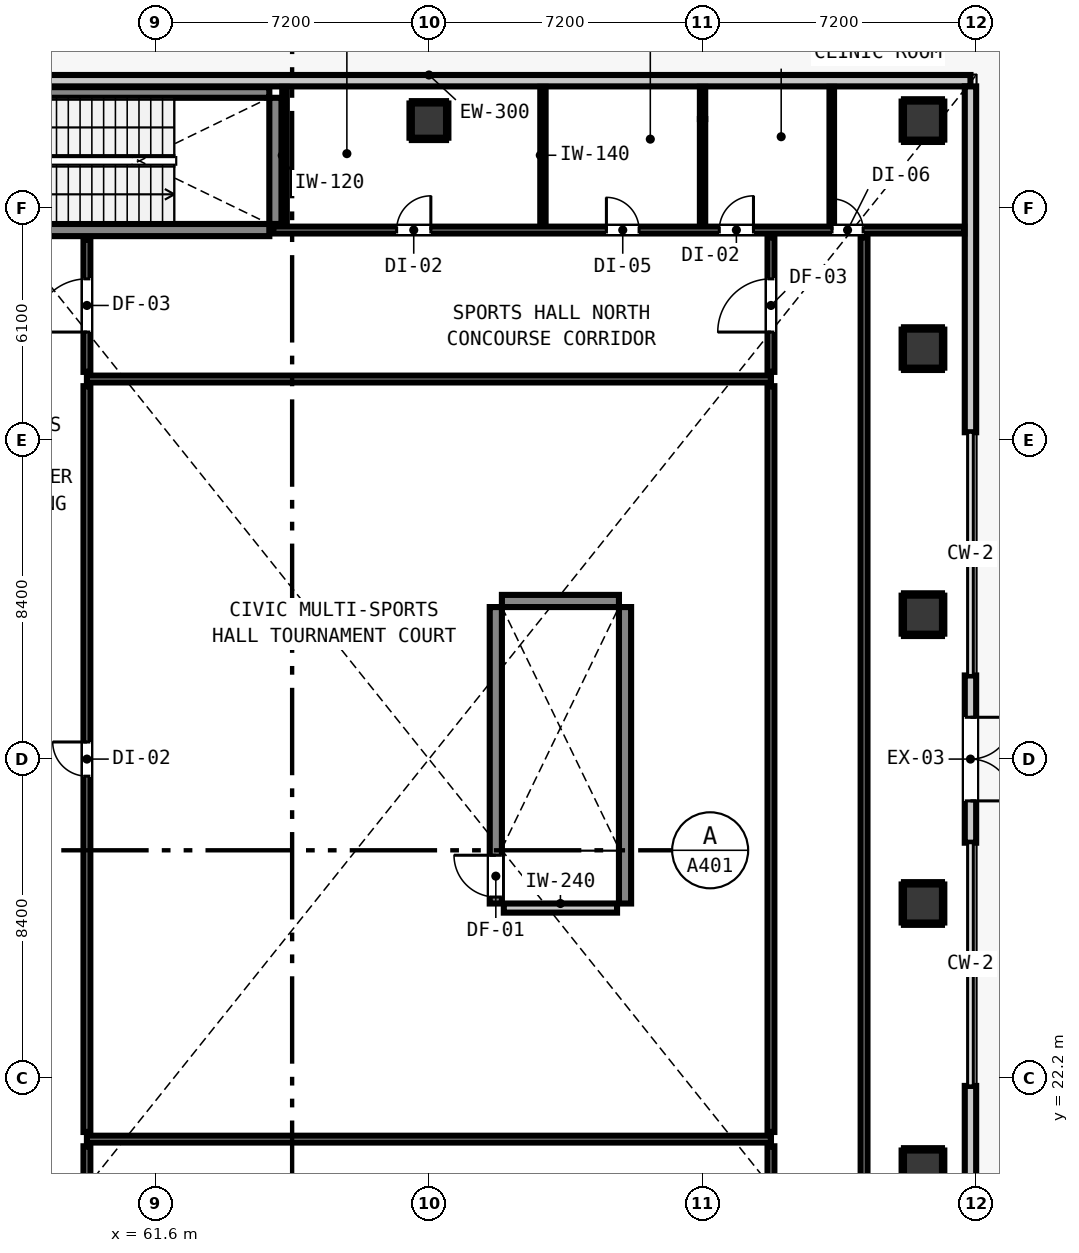
"""IFC4 building model, lengths in metres.
Left out: names, types, materials, properties, quantities, classifications, styles, units other than length and angle.
Written with IfcOpenShell. Run it as: python <this file> out.ifc"""

import sys

from ifc_helpers import new_model, si_unit, direction, frame, frame_2d, origin, origin_2d, place, context, subcontext, project, spatial, rectangle, circle, extrude, element, fill, save


model = new_model("IFC4")
c1 = context("Model", 3, precision=1e-05, world=origin(), true_north=direction((0.0, 1.0)))
c2 = subcontext(c1, "Body", "Model", "MODEL_VIEW")
j1 = project(units=[si_unit("LENGTHUNIT", "METRE"), si_unit("PLANEANGLEUNIT", "RADIAN")], contexts=[c1])
p1 = place(None, origin())
s1 = spatial("IfcSite", under=j1, at=p1, CompositionType="ELEMENT")
p2 = place(p1, origin())
s2 = spatial("IfcBuilding", under=s1, at=p2, CompositionType="ELEMENT")
p3 = place(p2, origin())
s3 = spatial("IfcBuildingStorey", under=s2, at=p3, CompositionType="ELEMENT", Elevation=0.0)
p4 = place(p3, frame((64.76, 44.68, 0.0), z_axis=(0.0, 0.0, 1.0), x_axis=(0.0, 1.0, 0.0)))
e1 = element("IfcWall", 1, at=p4, inside=s3, PredefinedType="SHEAR", context=c2, shape_type="SweptSolid", body=[
    extrude(rectangle(XDim=3.32, YDim=0.32, at=frame_2d((1.66, 0.0))), origin(), (0.0, 0.0, 1.0), 5.2),
])
p5 = place(p3, frame((56.2, 48.14, 0.0), z_axis=(0.0, 0.0, 1.0), x_axis=(1.0, 0.0, 0.0)))
e2 = element("IfcWall", 2, at=p5, inside=s3, PredefinedType="SHEAR", context=c2, shape_type="SweptSolid", body=[
    extrude(rectangle(XDim=8.4, YDim=0.28, at=frame_2d((4.2, 0.0))), origin(), (0.0, 0.0, 1.0), 5.2),
])
p6 = place(p3, frame((56.2, 44.52, 0.0), z_axis=(0.0, 0.0, 1.0), x_axis=(1.0, 0.0, 0.0)))
e3 = element("IfcWall", 3, at=p6, inside=s3, PredefinedType="SHEAR", context=c2, shape_type="SweptSolid", body=[
    extrude(rectangle(XDim=8.4, YDim=0.32, at=frame_2d((4.2, 0.0))), origin(), (0.0, 0.0, 1.0), 5.2),
])
p7 = place(p6, frame((0.23, 0.0, 0.0)))
e4 = element("IfcOpeningElement", 4, at=p7, cuts=e3, PredefinedType="OPENING", context=c2, shape_type="SweptSolid", body=[
    extrude(rectangle(XDim=1.1, YDim=2.15, at=frame_2d((0.55, 1.075))), frame((0.0, 0.17, 0.0), z_axis=(0.0, -1.0, 0.0), x_axis=(1.0, 0.0, 0.0)), (0.0, 0.0, 1.0), 0.34),
])
p8 = place(p3, frame((70.72, 34.76, 0.0), z_axis=(0.0, 0.0, 1.0), x_axis=(1.0, 0.0, 0.0)))
e5 = element("IfcWall", 5, at=p8, inside=s3, PredefinedType="SHEAR", context=c2, shape_type="SweptSolid", body=[
    extrude(rectangle(XDim=3.08, YDim=0.32, at=frame_2d((1.54, 0.0))), origin(), (0.0, 0.0, 1.0), 5.2),
])
p9 = place(p3, frame((73.96, 26.8, 0.0), z_axis=(0.0, 0.0, 1.0), x_axis=(0.0, 1.0, 0.0)))
e6 = element("IfcWall", 6, at=p9, inside=s3, PredefinedType="SHEAR", context=c2, shape_type="SweptSolid", body=[
    extrude(rectangle(XDim=7.8, YDim=0.32, at=frame_2d((3.9, 0.0))), origin(), (0.0, 0.0, 1.0), 5.2),
])
p10 = place(p3, frame((70.56, 26.8, 0.0), z_axis=(0.0, 0.0, 1.0), x_axis=(0.0, 1.0, 0.0)))
e7 = element("IfcWall", 7, at=p10, inside=s3, PredefinedType="SHEAR", context=c2, shape_type="SweptSolid", body=[
    extrude(rectangle(XDim=7.8, YDim=0.32, at=frame_2d((3.9, 0.0))), origin(), (0.0, 0.0, 1.0), 5.2),
])
p11 = place(p10, frame((0.17, 0.0, 0.0)))
e8 = element("IfcOpeningElement", 8, at=p11, cuts=e7, PredefinedType="OPENING", context=c2, shape_type="SweptSolid", body=[
    extrude(rectangle(XDim=1.1, YDim=2.15, at=frame_2d((0.55, 1.075))), frame((0.0, 0.17, 0.0), z_axis=(0.0, -1.0, 0.0), x_axis=(1.0, 0.0, 0.0)), (0.0, 0.0, 1.0), 0.34),
])
for number, where, z_axis, x_axis in (
    (9, (81.8, 19.8, 0.0), (0.0, 0.0, 1.0), (1.0, 0.0, 0.0)),
    (10, (81.8, 26.8, 0.0), (0.0, 0.0, 1.0), (1.0, 0.0, 0.0)),
    (11, (81.8, 34.4, 0.0), (0.0, 0.0, 1.0), (1.0, 0.0, 0.0)),
    (12, (81.8, 41.4, 0.0), (0.0, 0.0, 1.0), (1.0, 0.0, 0.0)),
    (13, (81.8, 47.4, 0.0), (0.0, 0.0, 1.0), (1.0, 0.0, 0.0)),
):
    element("IfcColumn", number, at=place(p3, frame(where, z_axis=z_axis, x_axis=x_axis)), inside=s3, PredefinedType="COLUMN", context=c2, shape_type="SweptSolid", body=[
        extrude(rectangle(XDim=1.0, YDim=1.0, at=origin_2d()), origin(), (0.0, 0.0, 1.0), 5.2),
    ])
p12 = place(p3, frame((68.8, 47.4, 0.0), z_axis=(0.0, 0.0, 1.0), x_axis=(1.0, 0.0, 0.0)))
e14 = element("IfcColumn", 14, at=p12, inside=s3, PredefinedType="COLUMN", context=c2, shape_type="SweptSolid", body=[
    extrude(circle(Radius=0.45, at=origin_2d()), origin(), (0.0, 0.0, 1.0), 5.2),
])
p13 = place(p3, frame((54.55, 48.45, 0.0), z_axis=(0.0, 0.0, 1.0), x_axis=(1.0, 0.0, 0.0)))
e15 = element("IfcWall", 15, at=p13, inside=s3, PredefinedType="STANDARD", context=c2, shape_type="SweptSolid", body=[
    extrude(rectangle(XDim=28.5, YDim=0.3, at=frame_2d((14.25, 0.0))), origin(), (0.0, 0.0, 1.0), 4.92),
])
p14 = place(p3, frame((83.05, 48.3, 0.0), z_axis=(0.0, 0.0, 1.0), x_axis=(0.0, -1.0, 0.0)))
e16 = element("IfcWall", 16, at=p14, inside=s3, PredefinedType="STANDARD", context=c2, shape_type="SweptSolid", body=[
    extrude(rectangle(XDim=9.1, YDim=0.3, at=frame_2d((4.55, 0.0))), origin(), (0.0, 0.0, 1.0), 4.92),
])
p15 = place(p3, frame((83.05, 32.8, 0.0), z_axis=(0.0, 0.0, 1.0), x_axis=(0.0, -1.0, 0.0)))
e17 = element("IfcWall", 17, at=p15, inside=s3, PredefinedType="STANDARD", context=c2, shape_type="SweptSolid", body=[
    extrude(rectangle(XDim=4.4, YDim=0.3, at=frame_2d((2.2, 0.0))), origin(), (0.0, 0.0, 1.0), 4.92),
])
p16 = place(p15, frame((1.1, 0.0, 0.0)))
e18 = element("IfcOpeningElement", 18, at=p16, cuts=e17, PredefinedType="OPENING", context=c2, shape_type="SweptSolid", body=[
    extrude(rectangle(XDim=2.2, YDim=2.4, at=frame_2d((1.1, 1.2))), frame((0.0, 0.16, 0.0), z_axis=(0.0, -1.0, 0.0), x_axis=(1.0, 0.0, 0.0)), (0.0, 0.0, 1.0), 0.32),
])
p17 = place(p3, frame((83.05, 22.0, 0.0), z_axis=(0.0, 0.0, 1.0), x_axis=(0.0, -1.0, 0.0)))
e19 = element("IfcWall", 19, at=p17, inside=s3, PredefinedType="STANDARD", context=c2, shape_type="SweptSolid", body=[
    extrude(rectangle(XDim=9.1, YDim=0.3, at=frame_2d((4.55, 0.0))), origin(), (0.0, 0.0, 1.0), 4.92),
])
p18 = place(p3, frame((70.77, 26.68, 0.0), z_axis=(0.0, 0.0, 1.0), x_axis=(1.0, 0.0, 0.0)))
e20 = element("IfcWall", 20, at=p18, inside=s3, PredefinedType="PARTITIONING", context=c2, shape_type="SweptSolid", body=[
    extrude(rectangle(XDim=2.98, YDim=0.24, at=frame_2d((1.49, 0.0))), origin(), (0.0, 0.0, 1.0), 4.92),
])
for number, where, z_axis, x_axis in (
    (21, (59.8, 20.6, 0.0), (0.0, 0.0, 1.0), (1.0, 0.0, 0.0)),
    (22, (59.8, 40.6, 0.0), (0.0, 0.0, 1.0), (1.0, 0.0, 0.0)),
):
    element("IfcWall", number, at=place(p3, frame(where, z_axis=z_axis, x_axis=x_axis)), inside=s3, PredefinedType="PARTITIONING", context=c2, shape_type="SweptSolid", body=[
        extrude(rectangle(XDim=18.0, YDim=0.18, at=frame_2d((9.0, 0.0))), origin(), (0.0, 0.0, 1.0), 4.92),
    ])
p19 = place(p3, frame((64.7, 44.52, 0.0), z_axis=(0.0, 0.0, 1.0), x_axis=(1.0, 0.0, 0.0)))
e23 = element("IfcWall", 23, at=p19, inside=s3, PredefinedType="PARTITIONING", context=c2, shape_type="SweptSolid", body=[
    extrude(rectangle(XDim=18.188, YDim=0.18, at=frame_2d((9.094, 0.0))), origin(), (0.0, 0.0, 1.0), 4.92),
])
p20 = place(p19, frame((3.25, 0.0, 0.0)))
e24 = element("IfcOpeningElement", 24, at=p20, cuts=e23, PredefinedType="OPENING", context=c2, shape_type="SweptSolid", body=[
    extrude(rectangle(XDim=0.9, YDim=2.1, at=frame_2d((0.45, 1.05))), frame((0.0, 0.1, 0.0), z_axis=(0.0, -1.0, 0.0), x_axis=(1.0, 0.0, 0.0)), (0.0, 0.0, 1.0), 0.2),
])
p21 = place(p19, frame((8.77, 0.0, 0.0)))
e25 = element("IfcOpeningElement", 25, at=p21, cuts=e23, PredefinedType="OPENING", context=c2, shape_type="SweptSolid", body=[
    extrude(rectangle(XDim=0.86, YDim=2.02, at=frame_2d((0.43, 1.01))), frame((0.0, 0.1, 0.0), z_axis=(0.0, -1.0, 0.0), x_axis=(1.0, 0.0, 0.0)), (0.0, 0.0, 1.0), 0.2),
])
p22 = place(p19, frame((11.74, 0.0, 0.0)))
e26 = element("IfcOpeningElement", 26, at=p22, cuts=e23, PredefinedType="OPENING", context=c2, shape_type="SweptSolid", body=[
    extrude(rectangle(XDim=0.9, YDim=2.1, at=frame_2d((0.45, 1.05))), frame((0.0, 0.1, 0.0), z_axis=(0.0, -1.0, 0.0), x_axis=(1.0, 0.0, 0.0)), (0.0, 0.0, 1.0), 0.2),
])
p23 = place(p19, frame((14.706, 0.0, 0.0)))
e27 = element("IfcOpeningElement", 27, at=p23, cuts=e23, PredefinedType="OPENING", context=c2, shape_type="SweptSolid", body=[
    extrude(rectangle(XDim=0.82, YDim=2.0, at=frame_2d((0.41, 1.0))), frame((0.0, 0.1, 0.0), z_axis=(0.0, -1.0, 0.0), x_axis=(1.0, 0.0, 0.0)), (0.0, 0.0, 1.0), 0.2),
])
p24 = place(p3, frame((59.8, 16.94, 0.0), z_axis=(0.0, 0.0, 1.0), x_axis=(0.0, 1.0, 0.0)))
e28 = element("IfcWall", 28, at=p24, inside=s3, PredefinedType="PARTITIONING", context=c2, shape_type="SweptSolid", body=[
    extrude(rectangle(XDim=3.472, YDim=0.18, at=frame_2d((1.736, 0.0))), origin(), (0.0, 0.0, 1.0), 4.92),
])
p25 = place(p24, frame((1.024, 0.0, 0.0)))
e29 = element("IfcOpeningElement", 29, at=p25, cuts=e28, PredefinedType="OPENING", context=c2, shape_type="SweptSolid", body=[
    extrude(rectangle(XDim=1.4, YDim=2.15, at=frame_2d((0.7, 1.075))), frame((0.0, 0.1, 0.0), z_axis=(0.0, -1.0, 0.0), x_axis=(1.0, 0.0, 0.0)), (0.0, 0.0, 1.0), 0.2),
])
p26 = place(p3, frame((59.8, 20.788, 0.0), z_axis=(0.0, 0.0, 1.0), x_axis=(0.0, 1.0, 0.0)))
e30 = element("IfcWall", 30, at=p26, inside=s3, PredefinedType="PARTITIONING", context=c2, shape_type="SweptSolid", body=[
    extrude(rectangle(XDim=19.624, YDim=0.18, at=frame_2d((9.812, 0.0))), origin(), (0.0, 0.0, 1.0), 4.92),
])
p27 = place(p26, frame((9.362, 0.0, 0.0)))
e31 = element("IfcOpeningElement", 31, at=p27, cuts=e30, PredefinedType="OPENING", context=c2, shape_type="SweptSolid", body=[
    extrude(rectangle(XDim=0.9, YDim=2.1, at=frame_2d((0.45, 1.05))), frame((0.0, 0.1, 0.0), z_axis=(0.0, -1.0, 0.0), x_axis=(1.0, 0.0, 0.0)), (0.0, 0.0, 1.0), 0.2),
])
p28 = place(p3, frame((59.8, 40.788, 0.0), z_axis=(0.0, 0.0, 1.0), x_axis=(0.0, 1.0, 0.0)))
e32 = element("IfcWall", 32, at=p28, inside=s3, PredefinedType="PARTITIONING", context=c2, shape_type="SweptSolid", body=[
    extrude(rectangle(XDim=3.472, YDim=0.18, at=frame_2d((1.736, 0.0))), origin(), (0.0, 0.0, 1.0), 4.92),
])
p29 = place(p28, frame((1.048, 0.0, 0.0)))
e33 = element("IfcOpeningElement", 33, at=p29, cuts=e32, PredefinedType="OPENING", context=c2, shape_type="SweptSolid", body=[
    extrude(rectangle(XDim=1.4, YDim=2.15, at=frame_2d((0.7, 1.075))), frame((0.0, 0.1, 0.0), z_axis=(0.0, -1.0, 0.0), x_axis=(1.0, 0.0, 0.0)), (0.0, 0.0, 1.0), 0.2),
])
p30 = place(p3, frame((77.8, 16.868, 0.0), z_axis=(0.0, 0.0, 1.0), x_axis=(0.0, 1.0, 0.0)))
e34 = element("IfcWall", 34, at=p30, inside=s3, PredefinedType="PARTITIONING", context=c2, shape_type="SweptSolid", body=[
    extrude(rectangle(XDim=3.544, YDim=0.18, at=frame_2d((1.772, 0.0))), origin(), (0.0, 0.0, 1.0), 4.92),
])
p31 = place(p30, frame((1.096, 0.0, 0.0)))
e35 = element("IfcOpeningElement", 35, at=p31, cuts=e34, PredefinedType="OPENING", context=c2, shape_type="SweptSolid", body=[
    extrude(rectangle(XDim=1.4, YDim=2.15, at=frame_2d((0.7, 1.075))), frame((0.0, 0.1, 0.0), z_axis=(0.0, -1.0, 0.0), x_axis=(1.0, 0.0, 0.0)), (0.0, 0.0, 1.0), 0.2),
])
p32 = place(p3, frame((77.8, 20.788, 0.0), z_axis=(0.0, 0.0, 1.0), x_axis=(0.0, 1.0, 0.0)))
e36 = element("IfcWall", 36, at=p32, inside=s3, PredefinedType="PARTITIONING", context=c2, shape_type="SweptSolid", body=[
    extrude(rectangle(XDim=19.624, YDim=0.18, at=frame_2d((9.812, 0.0))), origin(), (0.0, 0.0, 1.0), 4.92),
])
p33 = place(p3, frame((77.8, 40.788, 0.0), z_axis=(0.0, 0.0, 1.0), x_axis=(0.0, 1.0, 0.0)))
e37 = element("IfcWall", 37, at=p33, inside=s3, PredefinedType="PARTITIONING", context=c2, shape_type="SweptSolid", body=[
    extrude(rectangle(XDim=3.544, YDim=0.18, at=frame_2d((1.772, 0.0))), origin(), (0.0, 0.0, 1.0), 4.92),
])
p34 = place(p33, frame((1.048, 0.0, 0.0)))
e38 = element("IfcOpeningElement", 38, at=p34, cuts=e37, PredefinedType="OPENING", context=c2, shape_type="SweptSolid", body=[
    extrude(rectangle(XDim=1.4, YDim=2.15, at=frame_2d((0.7, 1.075))), frame((0.0, 0.1, 0.0), z_axis=(0.0, -1.0, 0.0), x_axis=(1.0, 0.0, 0.0)), (0.0, 0.0, 1.0), 0.2),
])
p35 = place(p3, frame((80.25, 18.645, 0.0), z_axis=(0.0, 0.0, 1.0), x_axis=(0.0, 1.0, 0.0)))
e39 = element("IfcWall", 39, at=p35, inside=s3, PredefinedType="PARTITIONING", context=c2, shape_type="SweptSolid", body=[
    extrude(rectangle(XDim=25.687, YDim=0.18, at=frame_2d((12.844, 0.0))), origin(), (0.0, 0.0, 1.0), 4.92),
])
p36 = place(p3, frame((71.8, 44.688, 0.0), z_axis=(0.0, 0.0, 1.0), x_axis=(0.0, 1.0, 0.0)))
e40 = element("IfcWall", 40, at=p36, inside=s3, PredefinedType="PARTITIONING", context=c2, shape_type="SweptSolid", body=[
    extrude(rectangle(XDim=3.6, YDim=0.14, at=frame_2d((1.8, 0.0))), origin(), (0.0, 0.0, 1.0), 4.92),
])
p37 = place(p3, frame((76.0, 44.688, 0.0), z_axis=(0.0, 0.0, 1.0), x_axis=(0.0, 1.0, 0.0)))
e41 = element("IfcWall", 41, at=p37, inside=s3, PredefinedType="PARTITIONING", context=c2, shape_type="SweptSolid", body=[
    extrude(rectangle(XDim=2.752, YDim=0.14, at=frame_2d((1.376, 0.0))), origin(), (0.0, 0.0, 1.0), 4.551),
])
p38 = place(p3, frame((76.0, 47.44, 0.0), z_axis=(0.0, 0.0, 1.0), x_axis=(0.0, 1.0, 0.0)))
e42 = element("IfcWall", 42, at=p38, inside=s3, PredefinedType="PARTITIONING", context=c2, shape_type="SweptSolid", body=[
    extrude(rectangle(XDim=0.848, YDim=0.14, at=frame_2d((0.424, 0.0))), origin(), (0.0, 0.0, 1.0), 4.92),
])
for number, where, z_axis, x_axis in (
    (43, (65.0, 44.678, 0.0), (0.0, 0.0, 1.0), (0.0, 1.0, 0.0)),
    (44, (79.4, 44.678, 0.0), (0.0, 0.0, 1.0), (0.0, 1.0, 0.0)),
):
    element("IfcWall", number, at=place(p3, frame(where, z_axis=z_axis, x_axis=x_axis)), inside=s3, PredefinedType="PARTITIONING", context=c2, shape_type="SweptSolid", body=[
        extrude(rectangle(XDim=3.61, YDim=0.12, at=frame_2d((1.805, 0.0))), origin(), (0.0, 0.0, 1.0), 4.92),
    ])
for number, where, z_axis, x_axis in (
    (45, (81.3, 20.332, 0.0), (0.0, 0.0, 1.0), (1.0, 0.0, 0.0)),
    (46, (81.268, 19.3, 0.0), (0.0, 0.0, 1.0), (0.0, 1.0, 0.0)),
    (47, (82.332, 19.3, 0.0), (0.0, 0.0, 1.0), (0.0, 1.0, 0.0)),
    (48, (81.3, 26.268, 0.0), (0.0, 0.0, 1.0), (1.0, 0.0, 0.0)),
    (49, (81.3, 27.332, 0.0), (0.0, 0.0, 1.0), (1.0, 0.0, 0.0)),
    (50, (81.268, 26.3, 0.0), (0.0, 0.0, 1.0), (0.0, 1.0, 0.0)),
    (51, (82.332, 26.3, 0.0), (0.0, 0.0, 1.0), (0.0, 1.0, 0.0)),
    (52, (81.3, 33.868, 0.0), (0.0, 0.0, 1.0), (1.0, 0.0, 0.0)),
    (53, (81.3, 34.932, 0.0), (0.0, 0.0, 1.0), (1.0, 0.0, 0.0)),
    (54, (81.268, 33.9, 0.0), (0.0, 0.0, 1.0), (0.0, 1.0, 0.0)),
    (55, (82.332, 33.9, 0.0), (0.0, 0.0, 1.0), (0.0, 1.0, 0.0)),
    (56, (81.3, 40.868, 0.0), (0.0, 0.0, 1.0), (1.0, 0.0, 0.0)),
    (57, (81.3, 41.932, 0.0), (0.0, 0.0, 1.0), (1.0, 0.0, 0.0)),
    (58, (81.268, 40.9, 0.0), (0.0, 0.0, 1.0), (0.0, 1.0, 0.0)),
    (59, (82.332, 40.9, 0.0), (0.0, 0.0, 1.0), (0.0, 1.0, 0.0)),
    (60, (81.3, 46.868, 0.0), (0.0, 0.0, 1.0), (1.0, 0.0, 0.0)),
    (61, (81.3, 47.932, 0.0), (0.0, 0.0, 1.0), (1.0, 0.0, 0.0)),
    (62, (81.268, 46.9, 0.0), (0.0, 0.0, 1.0), (0.0, 1.0, 0.0)),
    (63, (82.332, 46.9, 0.0), (0.0, 0.0, 1.0), (0.0, 1.0, 0.0)),
):
    element("IfcWall", number, at=place(p3, frame(where, z_axis=z_axis, x_axis=x_axis)), inside=s3, PredefinedType="PARTITIONING", context=c2, shape_type="SweptSolid", body=[
        extrude(rectangle(XDim=1.0, YDim=0.06, at=frame_2d((0.5, 0.0))), origin(), (0.0, 0.0, 1.0), 1.45),
    ])
for number, where, z_axis, x_axis in (
    (64, (68.35, 46.918, 0.0), (0.0, 0.0, 1.0), (1.0, 0.0, 0.0)),
    (65, (68.35, 47.882, 0.0), (0.0, 0.0, 1.0), (1.0, 0.0, 0.0)),
):
    element("IfcWall", number, at=place(p3, frame(where, z_axis=z_axis, x_axis=x_axis)), inside=s3, PredefinedType="PARTITIONING", context=c2, shape_type="SweptSolid", body=[
        extrude(rectangle(XDim=0.9, YDim=0.06, at=frame_2d((0.45, 0.0))), origin(), (0.0, 0.0, 1.0), 1.45),
    ])
for number, where, z_axis, x_axis in (
    (66, (68.318, 46.95, 0.0), (0.0, 0.0, 1.0), (0.0, 1.0, 0.0)),
    (67, (69.282, 46.95, 0.0), (0.0, 0.0, 1.0), (0.0, 1.0, 0.0)),
):
    element("IfcWall", number, at=place(p3, frame(where, z_axis=z_axis, x_axis=x_axis)), inside=s3, PredefinedType="PARTITIONING", context=c2, shape_type="SweptSolid", body=[
        extrude(rectangle(XDim=0.9, YDim=0.06, at=frame_2d((0.45, 0.0))), origin(), (0.0, 0.0, 1.0), 1.45),
    ])
p39 = place(p16, origin())
e68 = element("IfcDoor", 68, at=p39, inside=s3, OperationType="DOUBLE_DOOR_SINGLE_SWING", PredefinedType="DOOR", context=c2, shape_type="SweptSolid", body=[
    extrude(rectangle(XDim=2.2, YDim=2.4, at=frame_2d((1.1, 1.2))), frame((0.0, 0.025, 0.0), z_axis=(0.0, -1.0, 0.0), x_axis=(1.0, 0.0, 0.0)), (0.0, 0.0, 1.0), 0.05),
])
fill(e18, e68)
p40 = place(p11, origin())
e69 = element("IfcDoor", 69, at=p40, inside=s3, OperationType="SINGLE_SWING_RIGHT", PredefinedType="DOOR", context=c2, shape_type="SweptSolid", body=[
    extrude(rectangle(XDim=1.1, YDim=2.15, at=frame_2d((0.55, 1.075))), frame((0.0, 0.025, 0.0), z_axis=(0.0, -1.0, 0.0), x_axis=(1.0, 0.0, 0.0)), (0.0, 0.0, 1.0), 0.05),
])
fill(e8, e69)
p41 = place(p29, origin())
e70 = element("IfcDoor", 70, at=p41, inside=s3, OperationType="SINGLE_SWING_LEFT", PredefinedType="DOOR", context=c2, shape_type="SweptSolid", body=[
    extrude(rectangle(XDim=1.4, YDim=2.15, at=frame_2d((0.7, 1.075))), frame((0.0, 0.025, 0.0), z_axis=(0.0, -1.0, 0.0), x_axis=(1.0, 0.0, 0.0)), (0.0, 0.0, 1.0), 0.05),
])
fill(e33, e70)
p42 = place(p34, origin())
e71 = element("IfcDoor", 71, at=p42, inside=s3, OperationType="SINGLE_SWING_LEFT", PredefinedType="DOOR", context=c2, shape_type="SweptSolid", body=[
    extrude(rectangle(XDim=1.4, YDim=2.15, at=frame_2d((0.7, 1.075))), frame((0.0, 0.025, 0.0), z_axis=(0.0, -1.0, 0.0), x_axis=(1.0, 0.0, 0.0)), (0.0, 0.0, 1.0), 0.05),
])
fill(e38, e71)
p43 = place(p27, origin())
e72 = element("IfcDoor", 72, at=p43, inside=s3, OperationType="SINGLE_SWING_RIGHT", PredefinedType="DOOR", context=c2, shape_type="SweptSolid", body=[
    extrude(rectangle(XDim=0.9, YDim=2.1, at=frame_2d((0.45, 1.05))), frame((0.0, 0.025, 0.0), z_axis=(0.0, -1.0, 0.0), x_axis=(1.0, 0.0, 0.0)), (0.0, 0.0, 1.0), 0.05),
])
fill(e31, e72)
p44 = place(p20, origin())
e73 = element("IfcDoor", 73, at=p44, inside=s3, OperationType="SINGLE_SWING_RIGHT", PredefinedType="DOOR", context=c2, shape_type="SweptSolid", body=[
    extrude(rectangle(XDim=0.9, YDim=2.1, at=frame_2d((0.45, 1.05))), frame((0.0, 0.025, 0.0), z_axis=(0.0, -1.0, 0.0), x_axis=(1.0, 0.0, 0.0)), (0.0, 0.0, 1.0), 0.05),
])
fill(e24, e73)
p45 = place(p21, origin())
e74 = element("IfcDoor", 74, at=p45, inside=s3, OperationType="SINGLE_SWING_LEFT", PredefinedType="DOOR", context=c2, shape_type="SweptSolid", body=[
    extrude(rectangle(XDim=0.86, YDim=2.02, at=frame_2d((0.43, 1.01))), frame((0.0, 0.025, 0.0), z_axis=(0.0, -1.0, 0.0), x_axis=(1.0, 0.0, 0.0)), (0.0, 0.0, 1.0), 0.05),
])
fill(e25, e74)
p46 = place(p22, origin())
e75 = element("IfcDoor", 75, at=p46, inside=s3, OperationType="SINGLE_SWING_RIGHT", PredefinedType="DOOR", context=c2, shape_type="SweptSolid", body=[
    extrude(rectangle(XDim=0.9, YDim=2.1, at=frame_2d((0.45, 1.05))), frame((0.0, 0.025, 0.0), z_axis=(0.0, -1.0, 0.0), x_axis=(1.0, 0.0, 0.0)), (0.0, 0.0, 1.0), 0.05),
])
fill(e26, e75)
p47 = place(p23, origin())
e76 = element("IfcDoor", 76, at=p47, inside=s3, OperationType="SINGLE_SWING_LEFT", PredefinedType="DOOR", context=c2, shape_type="SweptSolid", body=[
    extrude(rectangle(XDim=0.82, YDim=2.0, at=frame_2d((0.41, 1.0))), frame((0.0, 0.025, 0.0), z_axis=(0.0, -1.0, 0.0), x_axis=(1.0, 0.0, 0.0)), (0.0, 0.0, 1.0), 0.05),
])
fill(e27, e76)
save(model, sys.argv[1])
